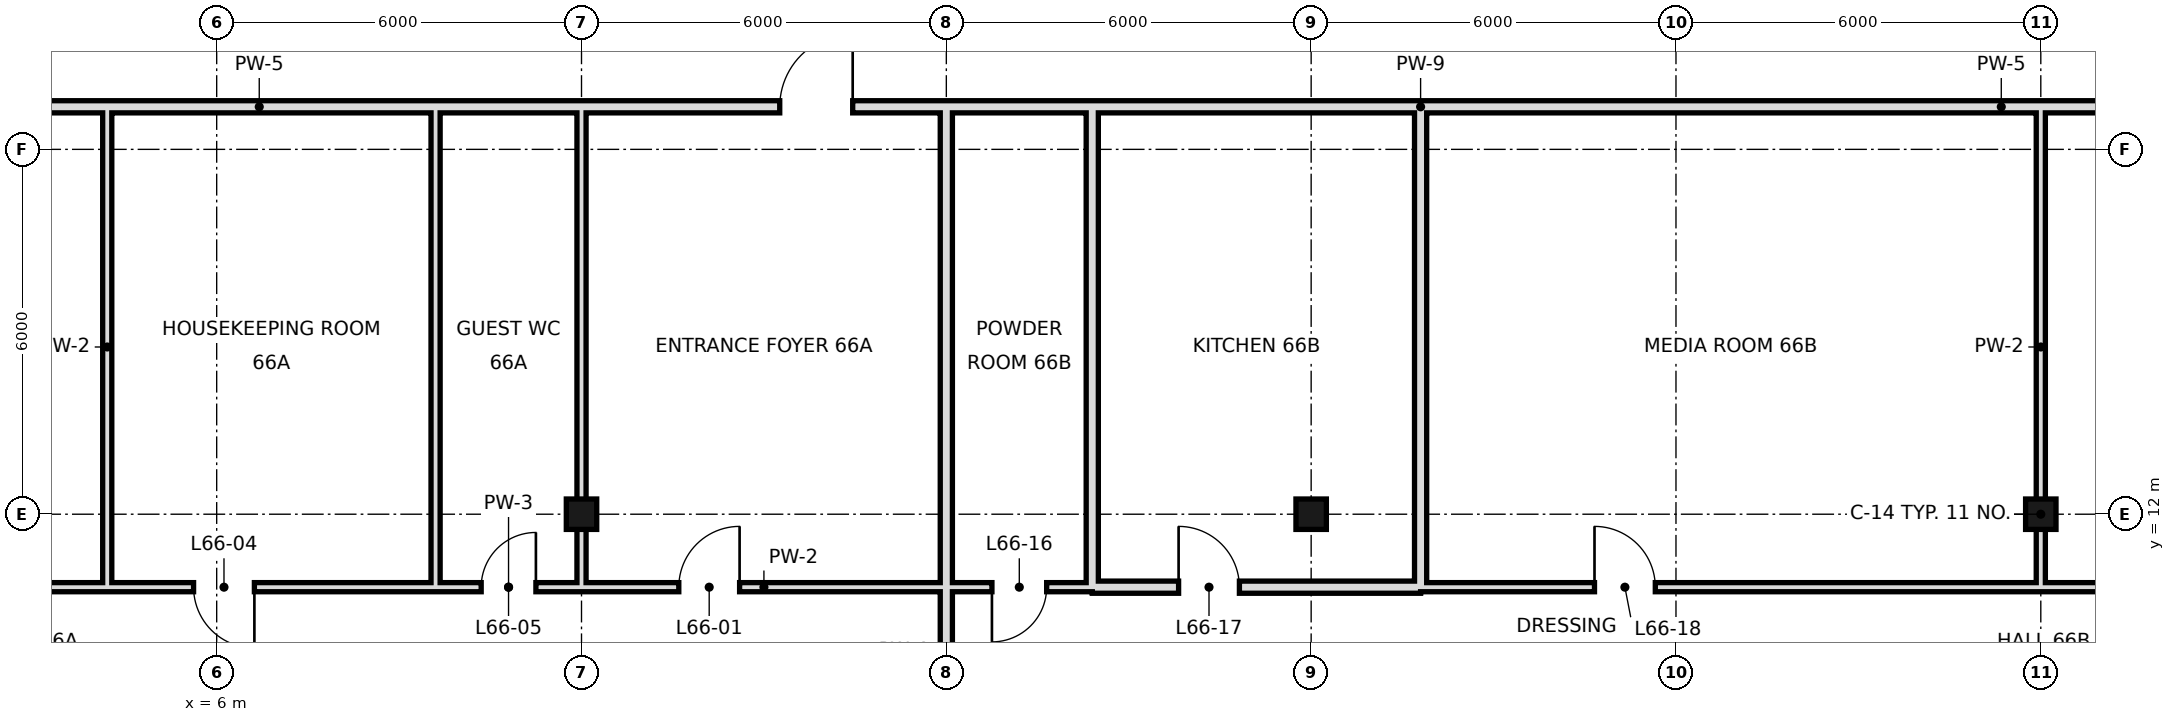
"""IFC4 building model, lengths in metres.
Left out: names, types, materials, properties, quantities, classifications, styles, units other than length and angle.
Written with IfcOpenShell. Run it as: python <this file> out.ifc"""

import sys

from ifc_helpers import new_model, si_unit, direction, frame, frame_2d, origin, origin_2d, place, context, subcontext, project, spatial, rectangle, hollow_rectangle, extrude, element, fill, save


model = new_model("IFC4")
c1 = context("Model", 3, precision=1e-05, world=origin(), true_north=direction((0.0, 1.0)))
c2 = subcontext(c1, "Body", "Model", "MODEL_VIEW")
j1 = project(units=[si_unit("LENGTHUNIT", "METRE"), si_unit("PLANEANGLEUNIT", "RADIAN")], contexts=[c1])
p1 = place(None, origin())
s1 = spatial("IfcSite", under=j1, at=p1, CompositionType="ELEMENT")
p2 = place(p1, origin())
s2 = spatial("IfcBuilding", under=s1, at=p2, CompositionType="ELEMENT")
p3 = place(p2, frame((0.0, 0.0, 277.4)))
s3 = spatial("IfcBuildingStorey", under=s2, at=p3, CompositionType="ELEMENT", Elevation=277.4)
for number, where, z_axis, x_axis in (
    (1, (12.0, 12.0, 0.0), (0.0, 0.0, 1.0), (1.0, 0.0, 0.0)),
    (2, (24.0, 12.0, 0.0), (0.0, 0.0, 1.0), (1.0, 0.0, 0.0)),
    (3, (36.0, 12.0, 0.0), (0.0, 0.0, 1.0), (1.0, 0.0, 0.0)),
):
    element("IfcColumn", number, at=place(p3, frame(where, z_axis=z_axis, x_axis=x_axis)), inside=s3, PredefinedType="COLUMN", context=c2, shape_type="SweptSolid", body=[
        extrude(hollow_rectangle(XDim=0.5, YDim=0.5, WallThickness=0.025, at=origin_2d()), origin(), (0.0, 0.0, 1.0), 4.4),
    ])
p4 = place(p3, frame((12.0, 10.8, 0.0), z_axis=(0.0, 0.0, 1.0), x_axis=(0.0, 1.0, 0.0)))
e4 = element("IfcWall", 4, at=p4, inside=s3, PredefinedType="PARTITIONING", context=c2, shape_type="SweptSolid", body=[
    extrude(rectangle(XDim=7.9, YDim=0.15, at=frame_2d((3.95, 0.0))), origin(), (0.0, 0.0, 1.0), 3.4),
])
p5 = place(p3, frame((18.0, -0.6, 0.0), z_axis=(0.0, 0.0, 1.0), x_axis=(0.0, 1.0, 0.0)))
e5 = element("IfcWall", 5, at=p5, inside=s3, PredefinedType="SOLIDWALL", context=c2, shape_type="SweptSolid", body=[
    extrude(rectangle(XDim=19.3, YDim=0.2, at=frame_2d((9.65, 0.0))), origin(), (0.0, 0.0, 1.0), 3.4),
])
for number, where, z_axis, x_axis in (
    (6, (20.4, 10.8, 0.0), (0.0, 0.0, 1.0), (0.0, 1.0, 0.0)),
    (7, (25.8, 10.8, 0.0), (0.0, 0.0, 1.0), (0.0, 1.0, 0.0)),
):
    element("IfcWall", number, at=place(p3, frame(where, z_axis=z_axis, x_axis=x_axis)), inside=s3, PredefinedType="SOLIDWALL", context=c2, shape_type="SweptSolid", body=[
        extrude(rectangle(XDim=7.9, YDim=0.2, at=frame_2d((3.95, 0.0))), origin(), (0.0, 0.0, 1.0), 3.4),
    ])
p6 = place(p3, frame((36.0, 10.8, 0.0), z_axis=(0.0, 0.0, 1.0), x_axis=(0.0, 1.0, 0.0)))
e8 = element("IfcWall", 8, at=p6, inside=s3, PredefinedType="PARTITIONING", context=c2, shape_type="SweptSolid", body=[
    extrude(rectangle(XDim=7.9, YDim=0.15, at=frame_2d((3.95, 0.0))), origin(), (0.0, 0.0, 1.0), 3.4),
])
for number, where, z_axis, x_axis in (
    (9, (4.2, 10.8, 0.0), (0.0, 0.0, 1.0), (0.0, 1.0, 0.0)),
    (10, (9.6, 10.8, 0.0), (0.0, 0.0, 1.0), (0.0, 1.0, 0.0)),
):
    element("IfcWall", number, at=place(p3, frame(where, z_axis=z_axis, x_axis=x_axis)), inside=s3, PredefinedType="PARTITIONING", context=c2, shape_type="SweptSolid", body=[
        extrude(rectangle(XDim=7.9, YDim=0.15, at=frame_2d((3.95, 0.0))), origin(), (0.0, 0.0, 1.0), 4.1),
    ])
p7 = place(p3, frame((20.4, 10.8, 0.0), z_axis=(0.0, 0.0, 1.0), x_axis=(1.0, 0.0, 0.0)))
e11 = element("IfcWall", 11, at=p7, inside=s3, PredefinedType="SOLIDWALL", context=c2, shape_type="SweptSolid", body=[
    extrude(rectangle(XDim=5.4, YDim=0.2, at=frame_2d((2.7, 0.0))), origin(), (0.0, 0.0, 1.0), 3.4),
])
p8 = place(p7, frame((1.42, 0.0, 0.0)))
e12 = element("IfcOpeningElement", 12, at=p8, cuts=e11, PredefinedType="OPENING", context=c2, shape_type="SweptSolid", body=[
    extrude(rectangle(XDim=1.0, YDim=2.4, at=frame_2d((0.5, 1.2))), frame((0.0, 0.11, 0.0), z_axis=(0.0, -1.0, 0.0), x_axis=(1.0, 0.0, 0.0)), (0.0, 0.0, 1.0), 0.22),
])
p9 = place(p3, frame((-7.8, 10.8, 0.0), z_axis=(0.0, 0.0, 1.0), x_axis=(1.0, 0.0, 0.0)))
e13 = element("IfcWall", 13, at=p9, inside=s3, PredefinedType="PARTITIONING", context=c2, shape_type="SweptSolid", body=[
    extrude(rectangle(XDim=17.4, YDim=0.15, at=frame_2d((8.7, 0.0))), origin(), (0.0, 0.0, 1.0), 4.1),
])
p10 = place(p9, frame((5.5, 0.0, 0.0)))
e14 = element("IfcOpeningElement", 14, at=p10, cuts=e13, PredefinedType="OPENING", context=c2, shape_type="SweptSolid", body=[
    extrude(rectangle(XDim=1.0, YDim=2.4, at=frame_2d((0.5, 1.2))), frame((0.0, 0.085, 0.0), z_axis=(0.0, -1.0, 0.0), x_axis=(1.0, 0.0, 0.0)), (0.0, 0.0, 1.0), 0.17),
])
p11 = place(p9, frame((13.42, 0.0, 0.0)))
e15 = element("IfcOpeningElement", 15, at=p11, cuts=e13, PredefinedType="OPENING", context=c2, shape_type="SweptSolid", body=[
    extrude(rectangle(XDim=1.0, YDim=2.4, at=frame_2d((0.5, 1.2))), frame((0.0, 0.085, 0.0), z_axis=(0.0, -1.0, 0.0), x_axis=(1.0, 0.0, 0.0)), (0.0, 0.0, 1.0), 0.17),
])
p12 = place(p3, frame((12.0, 10.8, 0.0), z_axis=(0.0, 0.0, 1.0), x_axis=(1.0, 0.0, 0.0)))
e16 = element("IfcWall", 16, at=p12, inside=s3, PredefinedType="PARTITIONING", context=c2, shape_type="SweptSolid", body=[
    extrude(rectangle(XDim=6.0, YDim=0.15, at=frame_2d((3.0, 0.0))), origin(), (0.0, 0.0, 1.0), 4.1),
])
p13 = place(p12, frame((1.6, 0.0, 0.0)))
e17 = element("IfcOpeningElement", 17, at=p13, cuts=e16, PredefinedType="OPENING", context=c2, shape_type="SweptSolid", body=[
    extrude(rectangle(XDim=1.0, YDim=2.4, at=frame_2d((0.5, 1.2))), frame((0.0, 0.085, 0.0), z_axis=(0.0, -1.0, 0.0), x_axis=(1.0, 0.0, 0.0)), (0.0, 0.0, 1.0), 0.17),
])
p14 = place(p3, frame((25.8, 10.8, 0.0), z_axis=(0.0, 0.0, 1.0), x_axis=(1.0, 0.0, 0.0)))
e18 = element("IfcWall", 18, at=p14, inside=s3, PredefinedType="PARTITIONING", context=c2, shape_type="SweptSolid", body=[
    extrude(rectangle(XDim=28.8, YDim=0.15, at=frame_2d((14.4, 0.0))), origin(), (0.0, 0.0, 1.0), 4.1),
])
p15 = place(p14, frame((12.7, 0.0, 0.0)))
e19 = element("IfcOpeningElement", 19, at=p15, cuts=e18, PredefinedType="OPENING", context=c2, shape_type="SweptSolid", body=[
    extrude(rectangle(XDim=1.0, YDim=2.4, at=frame_2d((0.5, 1.2))), frame((0.0, 0.085, 0.0), z_axis=(0.0, -1.0, 0.0), x_axis=(1.0, 0.0, 0.0)), (0.0, 0.0, 1.0), 0.17),
])
p16 = place(p14, frame((2.86, 0.0, 0.0)))
e20 = element("IfcOpeningElement", 20, at=p16, cuts=e18, PredefinedType="OPENING", context=c2, shape_type="SweptSolid", body=[
    extrude(rectangle(XDim=1.0, YDim=2.4, at=frame_2d((0.5, 1.2))), frame((0.0, 0.085, 0.0), z_axis=(0.0, -1.0, 0.0), x_axis=(1.0, 0.0, 0.0)), (0.0, 0.0, 1.0), 0.17),
])
p17 = place(p14, frame((19.6, 0.0, 0.0)))
e21 = element("IfcOpeningElement", 21, at=p17, cuts=e18, PredefinedType="OPENING", context=c2, shape_type="SweptSolid", body=[
    extrude(rectangle(XDim=1.0, YDim=2.4, at=frame_2d((0.5, 1.2))), frame((0.0, 0.085, 0.0), z_axis=(0.0, -1.0, 0.0), x_axis=(1.0, 0.0, 0.0)), (0.0, 0.0, 1.0), 0.17),
])
p18 = place(p3, frame((9.6, 10.8, 0.0), z_axis=(0.0, 0.0, 1.0), x_axis=(1.0, 0.0, 0.0)))
e22 = element("IfcWall", 22, at=p18, inside=s3, PredefinedType="PARTITIONING", context=c2, shape_type="SweptSolid", body=[
    extrude(rectangle(XDim=2.4, YDim=0.15, at=frame_2d((1.2, 0.0))), origin(), (0.0, 0.0, 1.0), 4.1),
])
p19 = place(p18, frame((0.75, 0.0, 0.0)))
e23 = element("IfcOpeningElement", 23, at=p19, cuts=e22, PredefinedType="OPENING", context=c2, shape_type="SweptSolid", body=[
    extrude(rectangle(XDim=0.9, YDim=2.4, at=frame_2d((0.45, 1.2))), frame((0.0, 0.085, 0.0), z_axis=(0.0, -1.0, 0.0), x_axis=(1.0, 0.0, 0.0)), (0.0, 0.0, 1.0), 0.17),
])
p20 = place(p3, frame((18.0, 10.8, 0.0), z_axis=(0.0, 0.0, 1.0), x_axis=(1.0, 0.0, 0.0)))
e24 = element("IfcWall", 24, at=p20, inside=s3, PredefinedType="PARTITIONING", context=c2, shape_type="SweptSolid", body=[
    extrude(rectangle(XDim=2.4, YDim=0.15, at=frame_2d((1.2, 0.0))), origin(), (0.0, 0.0, 1.0), 4.1),
])
p21 = place(p20, frame((0.75, 0.0, 0.0)))
e25 = element("IfcOpeningElement", 25, at=p21, cuts=e24, PredefinedType="OPENING", context=c2, shape_type="SweptSolid", body=[
    extrude(rectangle(XDim=0.9, YDim=2.4, at=frame_2d((0.45, 1.2))), frame((0.0, 0.085, 0.0), z_axis=(0.0, -1.0, 0.0), x_axis=(1.0, 0.0, 0.0)), (0.0, 0.0, 1.0), 0.17),
])
p22 = place(p3, frame((3.1, 18.7, 0.0), z_axis=(0.0, 0.0, 1.0), x_axis=(1.0, 0.0, 0.0)))
e26 = element("IfcWall", 26, at=p22, inside=s3, PredefinedType="SOLIDWALL", context=c2, shape_type="SweptSolid", body=[
    extrude(rectangle(XDim=17.3, YDim=0.2, at=frame_2d((8.65, 0.0))), origin(), (0.0, 0.0, 1.0), 3.4),
])
p23 = place(p22, frame((12.16, 0.0, 0.0)))
e27 = element("IfcOpeningElement", 27, at=p23, cuts=e26, PredefinedType="OPENING", context=c2, shape_type="SweptSolid", body=[
    extrude(rectangle(XDim=1.2, YDim=2.4, at=frame_2d((0.6, 1.2))), frame((0.0, 0.11, 0.0), z_axis=(0.0, -1.0, 0.0), x_axis=(1.0, 0.0, 0.0)), (0.0, 0.0, 1.0), 0.22),
])
p24 = place(p3, frame((25.8, 18.7, 0.0), z_axis=(0.0, 0.0, 1.0), x_axis=(1.0, 0.0, 0.0)))
e28 = element("IfcWall", 28, at=p24, inside=s3, PredefinedType="SOLIDWALL", context=c2, shape_type="SweptSolid", body=[
    extrude(rectangle(XDim=19.1, YDim=0.2, at=frame_2d((9.55, 0.0))), origin(), (0.0, 0.0, 1.0), 3.4),
])
p25 = place(p24, frame((12.6, 0.0, 0.0)))
e29 = element("IfcOpeningElement", 29, at=p25, cuts=e28, PredefinedType="OPENING", context=c2, shape_type="SweptSolid", body=[
    extrude(rectangle(XDim=1.2, YDim=2.4, at=frame_2d((0.6, 1.2))), frame((0.0, 0.11, 0.0), z_axis=(0.0, -1.0, 0.0), x_axis=(1.0, 0.0, 0.0)), (0.0, 0.0, 1.0), 0.22),
])
p26 = place(p3, frame((20.4, 18.7, 0.0), z_axis=(0.0, 0.0, 1.0), x_axis=(1.0, 0.0, 0.0)))
e30 = element("IfcWall", 30, at=p26, inside=s3, PredefinedType="SOLIDWALL", context=c2, shape_type="SweptSolid", body=[
    extrude(rectangle(XDim=5.4, YDim=0.2, at=frame_2d((2.7, 0.0))), origin(), (0.0, 0.0, 1.0), 4.1),
])
p27 = place(p13, frame((1.0, 0.0, 0.0), z_axis=(0.0, 0.0, 1.0), x_axis=(-1.0, 0.0, 0.0)))
e31 = element("IfcDoor", 31, at=p27, inside=s3, OperationType="SINGLE_SWING_LEFT", PredefinedType="DOOR", context=c2, shape_type="SweptSolid", body=[
    extrude(rectangle(XDim=1.0, YDim=2.4, at=frame_2d((0.5, 1.2))), frame((0.0, 0.025, 0.0), z_axis=(0.0, -1.0, 0.0), x_axis=(1.0, 0.0, 0.0)), (0.0, 0.0, 1.0), 0.05),
])
fill(e17, e31)
p28 = place(p11, origin())
e32 = element("IfcDoor", 32, at=p28, inside=s3, OperationType="SINGLE_SWING_RIGHT", PredefinedType="DOOR", context=c2, shape_type="SweptSolid", body=[
    extrude(rectangle(XDim=1.0, YDim=2.4, at=frame_2d((0.5, 1.2))), frame((0.0, 0.025, 0.0), z_axis=(0.0, -1.0, 0.0), x_axis=(1.0, 0.0, 0.0)), (0.0, 0.0, 1.0), 0.05),
])
fill(e15, e32)
p29 = place(p19, frame((0.9, 0.0, 0.0), z_axis=(0.0, 0.0, 1.0), x_axis=(-1.0, 0.0, 0.0)))
e33 = element("IfcDoor", 33, at=p29, inside=s3, OperationType="SINGLE_SWING_LEFT", PredefinedType="DOOR", context=c2, shape_type="SweptSolid", body=[
    extrude(rectangle(XDim=0.9, YDim=2.4, at=frame_2d((0.45, 1.2))), frame((0.0, 0.025, 0.0), z_axis=(0.0, -1.0, 0.0), x_axis=(1.0, 0.0, 0.0)), (0.0, 0.0, 1.0), 0.05),
])
fill(e23, e33)
p30 = place(p21, frame((0.9, 0.0, 0.0), z_axis=(0.0, 0.0, 1.0), x_axis=(-1.0, 0.0, 0.0)))
e34 = element("IfcDoor", 34, at=p30, inside=s3, OperationType="SINGLE_SWING_RIGHT", PredefinedType="DOOR", context=c2, shape_type="SweptSolid", body=[
    extrude(rectangle(XDim=0.9, YDim=2.4, at=frame_2d((0.45, 1.2))), frame((0.0, 0.025, 0.0), z_axis=(0.0, -1.0, 0.0), x_axis=(1.0, 0.0, 0.0)), (0.0, 0.0, 1.0), 0.05),
])
fill(e25, e34)
p31 = place(p8, origin())
e35 = element("IfcDoor", 35, at=p31, inside=s3, OperationType="SINGLE_SWING_LEFT", PredefinedType="DOOR", context=c2, shape_type="SweptSolid", body=[
    extrude(rectangle(XDim=1.0, YDim=2.4, at=frame_2d((0.5, 1.2))), frame((0.0, 0.025, 0.0), z_axis=(0.0, -1.0, 0.0), x_axis=(1.0, 0.0, 0.0)), (0.0, 0.0, 1.0), 0.05),
])
fill(e12, e35)
p32 = place(p16, origin())
e36 = element("IfcDoor", 36, at=p32, inside=s3, OperationType="SINGLE_SWING_LEFT", PredefinedType="DOOR", context=c2, shape_type="SweptSolid", body=[
    extrude(rectangle(XDim=1.0, YDim=2.4, at=frame_2d((0.5, 1.2))), frame((0.0, 0.025, 0.0), z_axis=(0.0, -1.0, 0.0), x_axis=(1.0, 0.0, 0.0)), (0.0, 0.0, 1.0), 0.05),
])
fill(e20, e36)
p33 = place(p23, frame((1.2, 0.0, 0.0), z_axis=(0.0, 0.0, 1.0), x_axis=(-1.0, 0.0, 0.0)))
e37 = element("IfcDoor", 37, at=p33, inside=s3, OperationType="SINGLE_SWING_LEFT", PredefinedType="DOOR", context=c2, shape_type="SweptSolid", body=[
    extrude(rectangle(XDim=1.2, YDim=2.4, at=frame_2d((0.6, 1.2))), frame((0.0, 0.025, 0.0), z_axis=(0.0, -1.0, 0.0), x_axis=(1.0, 0.0, 0.0)), (0.0, 0.0, 1.0), 0.05),
])
fill(e27, e37)
save(model, sys.argv[1])
